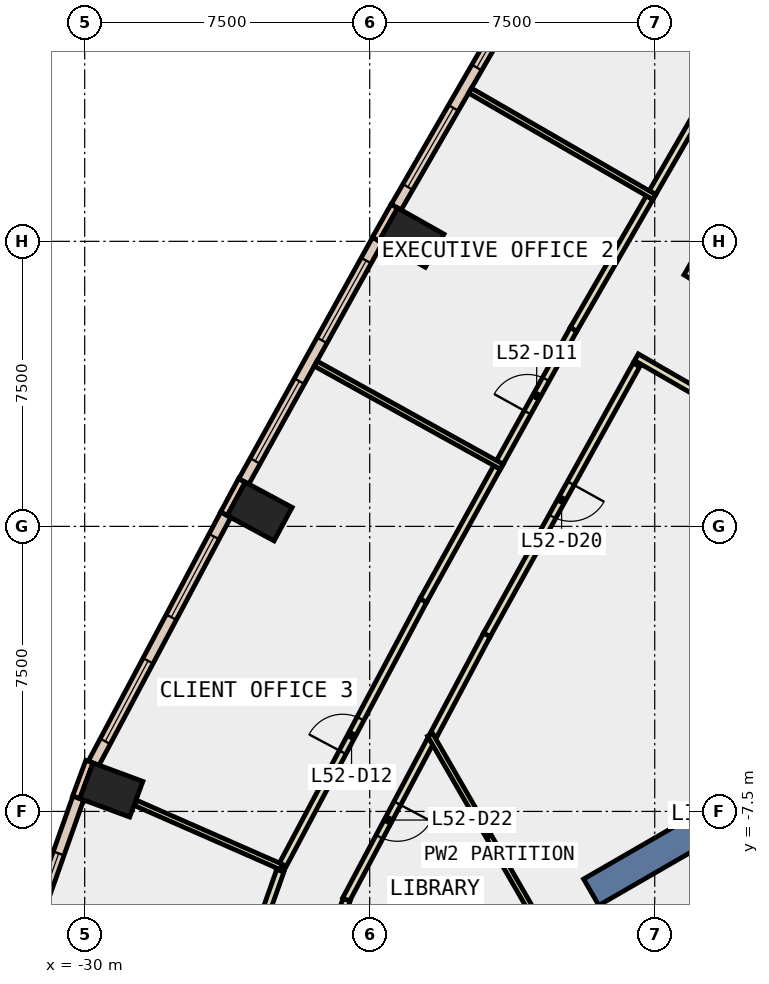
"""IFC4 building model, lengths in metres.
Left out: names, types, materials, properties, quantities, classifications, styles, units other than length and angle.
Written with IfcOpenShell. Run it as: python <this file> out.ifc"""

import sys

from ifc_helpers import new_model, si_unit, direction, frame, frame_2d, origin, origin_2d, place, context, subcontext, project, spatial, rectangle, extrude, element, fill, save


model = new_model("IFC4")
c1 = context("Model", 3, precision=1e-05, world=origin(), true_north=direction((0.0, 1.0)))
c2 = subcontext(c1, "Body", "Model", "MODEL_VIEW")
j1 = project(units=[si_unit("LENGTHUNIT", "METRE"), si_unit("PLANEANGLEUNIT", "RADIAN")], contexts=[c1])
p1 = place(None, origin())
s1 = spatial("IfcSite", under=j1, at=p1, CompositionType="ELEMENT")
p2 = place(p1, origin())
s2 = spatial("IfcBuilding", under=s1, at=p2, CompositionType="ELEMENT")
p3 = place(p2, frame((0.0, 0.0, 231.8)))
s3 = spatial("IfcBuildingStorey", under=s2, at=p3, CompositionType="ELEMENT", Elevation=231.8)
for number, where, z_axis, x_axis in (
    (1, (-21.4, 7.599, -0.4), (0.0, 0.0, 1.0), (0.491, 0.871, 0.0)),
    (2, (-25.395, 0.391, -0.4), (0.0, 0.0, 1.0), (0.474, 0.88, 0.0)),
    (3, (-29.299, -6.936, -0.4), (0.0, 0.0, 1.0), (0.347, 0.938, 0.0)),
):
    element("IfcColumn", number, at=place(p3, frame(where, z_axis=z_axis, x_axis=x_axis)), inside=s3, PredefinedType="COLUMN", context=c2, shape_type="SweptSolid", body=[
        extrude(rectangle(XDim=1.0, YDim=1.4, at=origin_2d()), origin(), (0.0, 0.0, 1.0), 4.0),
    ])
p4 = place(p3, frame((-8.877, -5.125, -0.4), z_axis=(0.0, 0.0, 1.0), x_axis=(-0.866017533419, -0.500013631625, 0.0)))
e4 = element("IfcWall", 4, at=p4, inside=s3, PredefinedType="SHEAR", context=c2, shape_type="SweptSolid", body=[
    extrude(rectangle(XDim=9.0, YDim=0.8, at=frame_2d((4.5, 0.0))), origin(), (0.0, 0.0, 1.0), 4.0),
])
p5 = place(p3, frame((-21.851, 8.427, 0.0), z_axis=(0.0, 0.0, 1.0), x_axis=(-0.491743606947, -0.87074004446, 0.0)))
e5 = element("IfcWall", 5, at=p5, inside=s3, PredefinedType="STANDARD", context=c2, shape_type="SweptSolid", body=[
    extrude(rectangle(XDim=1.0, YDim=0.2, at=frame_2d((0.5, 0.0))), origin(), (0.0, 0.0, 1.0), 3.6),
])
p6 = place(p3, frame((-25.862, 1.211, 0.0), z_axis=(0.0, 0.0, 1.0), x_axis=(-0.473765014438, -0.880651299377, 0.0)))
e6 = element("IfcWall", 6, at=p6, inside=s3, PredefinedType="STANDARD", context=c2, shape_type="SweptSolid", body=[
    extrude(rectangle(XDim=1.0, YDim=0.2, at=frame_2d((0.5, 0.0))), origin(), (0.0, 0.0, 1.0), 3.6),
])
p7 = place(p3, frame((-29.876, -6.19, 0.0), z_axis=(0.0, 0.0, 1.0), x_axis=(-0.346892928577, -0.937904737222, 0.0)))
e7 = element("IfcWall", 7, at=p7, inside=s3, PredefinedType="STANDARD", context=c2, shape_type="SweptSolid", body=[
    extrude(rectangle(XDim=1.0, YDim=0.2, at=frame_2d((0.5, 0.0))), origin(), (0.0, 0.0, 1.0), 3.6),
])
p8 = place(p3, frame((-18.175, 14.683, 0.0), z_axis=(0.0, 0.0, 1.0), x_axis=(-0.500075798504, -0.865981637075, 0.0)))
e8 = element("IfcWall", 8, at=p8, inside=s3, PredefinedType="STANDARD", context=c2, shape_type="SweptSolid", body=[
    extrude(rectangle(XDim=7.257, YDim=0.3, at=frame_2d((3.628, 0.0))), origin(), (0.0, 0.0, 1.0), 3.6),
])
p9 = place(p8, frame((0.614, 0.0, 0.9)))
e9 = element("IfcOpeningElement", 9, at=p9, cuts=e8, PredefinedType="OPENING", context=c2, shape_type="SweptSolid", body=[
    extrude(rectangle(XDim=2.4, YDim=2.6, at=frame_2d((1.2, 1.3))), frame((0.0, 0.16, 0.0), z_axis=(0.0, -1.0, 0.0), x_axis=(1.0, 0.0, 0.0)), (0.0, 0.0, 1.0), 0.32),
])
p10 = place(p8, frame((4.242, 0.0, 0.9)))
e10 = element("IfcOpeningElement", 10, at=p10, cuts=e8, PredefinedType="OPENING", context=c2, shape_type="SweptSolid", body=[
    extrude(rectangle(XDim=2.4, YDim=2.6, at=frame_2d((1.2, 1.3))), frame((0.0, 0.16, 0.0), z_axis=(0.0, -1.0, 0.0), x_axis=(1.0, 0.0, 0.0)), (0.0, 0.0, 1.0), 0.32),
])
p11 = place(p3, frame((-22.295, 7.531, 0.0), z_axis=(0.0, 0.0, 1.0), x_axis=(-0.484742980126, -0.874656643043, 0.0)))
e11 = element("IfcWall", 11, at=p11, inside=s3, PredefinedType="STANDARD", context=c2, shape_type="SweptSolid", body=[
    extrude(rectangle(XDim=7.258, YDim=0.3, at=frame_2d((3.629, 0.0))), origin(), (0.0, 0.0, 1.0), 3.6),
])
p12 = place(p11, frame((0.614, 0.0, 0.9)))
e12 = element("IfcOpeningElement", 12, at=p12, cuts=e11, PredefinedType="OPENING", context=c2, shape_type="SweptSolid", body=[
    extrude(rectangle(XDim=2.4, YDim=2.6, at=frame_2d((1.2, 1.3))), frame((0.0, 0.16, 0.0), z_axis=(0.0, -1.0, 0.0), x_axis=(1.0, 0.0, 0.0)), (0.0, 0.0, 1.0), 0.32),
])
p13 = place(p11, frame((4.243, 0.0, 0.9)))
e13 = element("IfcOpeningElement", 13, at=p13, cuts=e11, PredefinedType="OPENING", context=c2, shape_type="SweptSolid", body=[
    extrude(rectangle(XDim=2.4, YDim=2.6, at=frame_2d((1.2, 1.3))), frame((0.0, 0.16, 0.0), z_axis=(0.0, -1.0, 0.0), x_axis=(1.0, 0.0, 0.0)), (0.0, 0.0, 1.0), 0.32),
])
p14 = place(p3, frame((-26.289, 0.306, 0.0), z_axis=(0.0, 0.0, 1.0), x_axis=(-0.469429229062, -0.882970100797, 0.0)))
e14 = element("IfcWall", 14, at=p14, inside=s3, PredefinedType="STANDARD", context=c2, shape_type="SweptSolid", body=[
    extrude(rectangle(XDim=7.404, YDim=0.3, at=frame_2d((3.702, 0.0))), origin(), (0.0, 0.0, 1.0), 3.6),
])
p15 = place(p14, frame((0.651, 0.0, 0.9)))
e15 = element("IfcOpeningElement", 15, at=p15, cuts=e14, PredefinedType="OPENING", context=c2, shape_type="SweptSolid", body=[
    extrude(rectangle(XDim=2.4, YDim=2.6, at=frame_2d((1.2, 1.3))), frame((0.0, 0.16, 0.0), z_axis=(0.0, -1.0, 0.0), x_axis=(1.0, 0.0, 0.0)), (0.0, 0.0, 1.0), 0.32),
])
p16 = place(p14, frame((4.353, 0.0, 0.9)))
e16 = element("IfcOpeningElement", 16, at=p16, cuts=e14, PredefinedType="OPENING", context=c2, shape_type="SweptSolid", body=[
    extrude(rectangle(XDim=2.4, YDim=2.6, at=frame_2d((1.2, 1.3))), frame((0.0, 0.16, 0.0), z_axis=(0.0, -1.0, 0.0), x_axis=(1.0, 0.0, 0.0)), (0.0, 0.0, 1.0), 0.32),
])
p17 = place(p3, frame((-30.169, -7.147, 0.0), z_axis=(0.0, 0.0, 1.0), x_axis=(-0.333280640478, -0.942827669663, 0.0)))
e17 = element("IfcWall", 17, at=p17, inside=s3, PredefinedType="STANDARD", context=c2, shape_type="SweptSolid", body=[
    extrude(rectangle(XDim=4.492, YDim=0.3, at=frame_2d((2.246, 0.0))), origin(), (0.0, 0.0, 1.0), 3.6),
])
p18 = place(p17, frame((1.546, 0.0, 0.9)))
e18 = element("IfcOpeningElement", 18, at=p18, cuts=e17, PredefinedType="OPENING", context=c2, shape_type="SweptSolid", body=[
    extrude(rectangle(XDim=1.4, YDim=2.6, at=frame_2d((0.7, 1.3))), frame((0.0, 0.16, 0.0), z_axis=(0.0, -1.0, 0.0), x_axis=(1.0, 0.0, 0.0)), (0.0, 0.0, 1.0), 0.32),
])
p19 = place(p3, frame((-11.42, 11.283, 0.0), z_axis=(0.0, 0.0, 1.0), x_axis=(-0.500179011873, -0.86592202656, 0.0)))
e19 = element("IfcWall", 19, at=p19, inside=s3, PredefinedType="PARTITIONING", context=c2, shape_type="SweptSolid", body=[
    extrude(rectangle(XDim=5.446, YDim=0.2, at=frame_2d((2.723, 0.0))), origin(), (0.0, 0.0, 1.0), 3.6),
])
p20 = place(p19, frame((2.223, 0.0, 0.0)))
e20 = element("IfcOpeningElement", 20, at=p20, cuts=e19, PredefinedType="OPENING", context=c2, shape_type="SweptSolid", body=[
    extrude(rectangle(XDim=1.0, YDim=2.1, at=frame_2d((0.5, 1.05))), frame((0.0, 0.11, 0.0), z_axis=(0.0, -1.0, 0.0), x_axis=(1.0, 0.0, 0.0)), (0.0, 0.0, 1.0), 0.22),
])
p21 = place(p3, frame((-15.482, 4.249, 0.0), z_axis=(0.0, 0.0, 1.0), x_axis=(-0.484683114876, -0.874689818252, 0.0)))
e21 = element("IfcWall", 21, at=p21, inside=s3, PredefinedType="PARTITIONING", context=c2, shape_type="SweptSolid", body=[
    extrude(rectangle(XDim=8.123, YDim=0.2, at=frame_2d((4.062, 0.0))), origin(), (0.0, 0.0, 1.0), 3.6),
])
p22 = place(p21, frame((3.561, 0.0, 0.0)))
e22 = element("IfcOpeningElement", 22, at=p22, cuts=e21, PredefinedType="OPENING", context=c2, shape_type="SweptSolid", body=[
    extrude(rectangle(XDim=1.0, YDim=2.1, at=frame_2d((0.5, 1.05))), frame((0.0, 0.11, 0.0), z_axis=(0.0, -1.0, 0.0), x_axis=(1.0, 0.0, 0.0)), (0.0, 0.0, 1.0), 0.22),
])
p23 = place(p3, frame((-19.419, -2.856, 0.0), z_axis=(0.0, 0.0, 1.0), x_axis=(-0.469627838973, -0.882864481595, 0.0)))
e23 = element("IfcWall", 23, at=p23, inside=s3, PredefinedType="PARTITIONING", context=c2, shape_type="SweptSolid", body=[
    extrude(rectangle(XDim=2.996, YDim=0.2, at=frame_2d((1.498, 0.0))), origin(), (0.0, 0.0, 1.0), 3.6),
])
p24 = place(p3, frame((-20.896, -5.634, 0.0), z_axis=(0.0, 0.0, 1.0), x_axis=(-0.469448951755, -0.882959614986, 0.0)))
e24 = element("IfcWall", 24, at=p24, inside=s3, PredefinedType="PARTITIONING", context=c2, shape_type="SweptSolid", body=[
    extrude(rectangle(XDim=4.74, YDim=0.2, at=frame_2d((2.37, 0.0))), origin(), (0.0, 0.0, 1.0), 3.6),
])
p25 = place(p24, frame((1.87, 0.0, 0.0)))
e25 = element("IfcOpeningElement", 25, at=p25, cuts=e24, PredefinedType="OPENING", context=c2, shape_type="SweptSolid", body=[
    extrude(rectangle(XDim=1.0, YDim=2.1, at=frame_2d((0.5, 1.05))), frame((0.0, 0.11, 0.0), z_axis=(0.0, -1.0, 0.0), x_axis=(1.0, 0.0, 0.0)), (0.0, 0.0, 1.0), 0.22),
])
p26 = place(p3, frame((-23.108, -9.825, 0.0), z_axis=(0.0, 0.0, 1.0), x_axis=(-0.333166995935, -0.942867834227, 0.0)))
e26 = element("IfcWall", 26, at=p26, inside=s3, PredefinedType="PARTITIONING", context=c2, shape_type="SweptSolid", body=[
    extrude(rectangle(XDim=2.798, YDim=0.2, at=frame_2d((1.399, 0.0))), origin(), (0.0, 0.0, 1.0), 3.6),
])
p27 = place(p3, frame((-15.059, 8.78, 0.0), z_axis=(0.0, 0.0, 1.0), x_axis=(0.500093699572, 0.865971299552, 0.0)))
e27 = element("IfcWall", 27, at=p27, inside=s3, PredefinedType="PARTITIONING", context=c2, shape_type="SweptSolid", body=[
    extrude(rectangle(XDim=4.004, YDim=0.2, at=frame_2d((2.002, 0.0))), origin(), (0.0, 0.0, 1.0), 3.6),
])
p28 = place(p3, frame((-19.076, 1.684, 0.0), z_axis=(0.0, 0.0, 1.0), x_axis=(0.484679349661, 0.874691904623, 0.0)))
e28 = element("IfcWall", 28, at=p28, inside=s3, PredefinedType="PARTITIONING", context=c2, shape_type="SweptSolid", body=[
    extrude(rectangle(XDim=4.002, YDim=0.2, at=frame_2d((2.001, 0.0))), origin(), (0.0, 0.0, 1.0), 3.6),
])
p29 = place(p28, frame((1.501, 0.0, 0.0)))
e29 = element("IfcOpeningElement", 29, at=p29, cuts=e28, PredefinedType="OPENING", context=c2, shape_type="SweptSolid", body=[
    extrude(rectangle(XDim=1.0, YDim=2.1, at=frame_2d((0.5, 1.05))), frame((0.0, 0.11, 0.0), z_axis=(0.0, -1.0, 0.0), x_axis=(1.0, 0.0, 0.0)), (0.0, 0.0, 1.0), 0.22),
])
p30 = place(p3, frame((-17.136, 5.185, 0.0), z_axis=(0.0, 0.0, 1.0), x_axis=(0.500102734445, 0.865966081899, 0.0)))
e30 = element("IfcWall", 30, at=p30, inside=s3, PredefinedType="PARTITIONING", context=c2, shape_type="SweptSolid", body=[
    extrude(rectangle(XDim=4.001, YDim=0.2, at=frame_2d((2.0, 0.0))), origin(), (0.0, 0.0, 1.0), 3.6),
])
p31 = place(p3, frame((-24.866, -9.053, 0.0), z_axis=(0.0, 0.0, 1.0), x_axis=(0.469431794586, 0.882968736837, 0.0)))
e31 = element("IfcWall", 31, at=p31, inside=s3, PredefinedType="PARTITIONING", context=c2, shape_type="SweptSolid", body=[
    extrude(rectangle(XDim=8.046, YDim=0.2, at=frame_2d((4.023, 0.0))), origin(), (0.0, 0.0, 1.0), 3.6),
])
p32 = place(p31, frame((3.522, 0.0, 0.0)))
e32 = element("IfcOpeningElement", 32, at=p32, cuts=e31, PredefinedType="OPENING", context=c2, shape_type="SweptSolid", body=[
    extrude(rectangle(XDim=1.0, YDim=2.1, at=frame_2d((0.5, 1.05))), frame((0.0, 0.11, 0.0), z_axis=(0.0, -1.0, 0.0), x_axis=(1.0, 0.0, 0.0)), (0.0, 0.0, 1.0), 0.22),
])
p33 = place(p3, frame((-21.089, -1.949, 0.0), z_axis=(0.0, 0.0, 1.0), x_axis=(0.484622593188, 0.874723351793, 0.0)))
e33 = element("IfcWall", 33, at=p33, inside=s3, PredefinedType="PARTITIONING", context=c2, shape_type="SweptSolid", body=[
    extrude(rectangle(XDim=4.003, YDim=0.2, at=frame_2d((2.002, 0.0))), origin(), (0.0, 0.0, 1.0), 3.6),
])
p34 = place(p3, frame((-26.013, -12.345, 0.0), z_axis=(0.0, 0.0, 1.0), x_axis=(0.333116923704, 0.942885526001, 0.0)))
e34 = element("IfcWall", 34, at=p34, inside=s3, PredefinedType="PARTITIONING", context=c2, shape_type="SweptSolid", body=[
    extrude(rectangle(XDim=3.485, YDim=0.2, at=frame_2d((1.742, 0.0))), origin(), (0.0, 0.0, 1.0), 3.6),
])
p35 = place(p3, frame((-17.87, -10.749, 0.0), z_axis=(0.0, 0.0, 1.0), x_axis=(-0.499907758807, 0.866078652713, 0.0)))
e35 = element("IfcWall", 35, at=p35, inside=s3, PredefinedType="PARTITIONING", context=c2, shape_type="SweptSolid", body=[
    extrude(rectangle(XDim=6.083, YDim=0.15, at=frame_2d((3.042, 0.0))), origin(), (0.0, 0.0, 1.0), 3.6),
])
p36 = place(p3, frame((-15.01, 8.665, 0.0), z_axis=(0.0, 0.0, 1.0), x_axis=(-0.865961984968, 0.500109828528, 0.0)))
e36 = element("IfcWall", 36, at=p36, inside=s3, PredefinedType="PARTITIONING", context=c2, shape_type="SweptSolid", body=[
    extrude(rectangle(XDim=5.601, YDim=0.15, at=frame_2d((2.8, 0.0))), origin(), (0.0, 0.0, 1.0), 3.6),
])
p37 = place(p3, frame((-19.025, 1.57, 0.0), z_axis=(0.0, 0.0, 1.0), x_axis=(-0.874714019242, 0.484639437666, 0.0)))
e37 = element("IfcWall", 37, at=p37, inside=s3, PredefinedType="PARTITIONING", context=c2, shape_type="SweptSolid", body=[
    extrude(rectangle(XDim=5.6, YDim=0.15, at=frame_2d((2.8, 0.0))), origin(), (0.0, 0.0, 1.0), 3.6),
])
p38 = place(p3, frame((-24.819, -8.964, 0.0), z_axis=(0.0, 0.0, 1.0), x_axis=(-0.915460951187, 0.402406817602, 0.0)))
e38 = element("IfcWall", 38, at=p38, inside=s3, PredefinedType="PARTITIONING", context=c2, shape_type="SweptSolid", body=[
    extrude(rectangle(XDim=4.192, YDim=0.15, at=frame_2d((2.096, 0.0))), origin(), (0.0, 0.0, 1.0), 3.6),
])
p39 = place(p3, frame((-13.59, 3.36, 0.0), z_axis=(0.0, 0.0, 1.0), x_axis=(-0.866004963011, 0.500035402787, 0.0)))
e39 = element("IfcWall", 39, at=p39, inside=s3, PredefinedType="PARTITIONING", context=c2, shape_type="SweptSolid", body=[
    extrude(rectangle(XDim=2.183, YDim=0.2, at=frame_2d((1.092, 0.0))), origin(), (0.0, 0.0, 1.0), 3.6),
])
p40 = place(p9, origin())
e40 = element("IfcWindow", 40, at=p40, inside=s3, PartitioningType="SINGLE_PANEL", PredefinedType="WINDOW", context=c2, shape_type="SweptSolid", body=[
    extrude(rectangle(XDim=2.4, YDim=2.6, at=frame_2d((1.2, 1.3))), frame((0.0, 0.03, 0.0), z_axis=(0.0, -1.0, 0.0), x_axis=(1.0, 0.0, 0.0)), (0.0, 0.0, 1.0), 0.06),
])
fill(e9, e40)
p41 = place(p10, origin())
e41 = element("IfcWindow", 41, at=p41, inside=s3, PartitioningType="SINGLE_PANEL", PredefinedType="WINDOW", context=c2, shape_type="SweptSolid", body=[
    extrude(rectangle(XDim=2.4, YDim=2.6, at=frame_2d((1.2, 1.3))), frame((0.0, 0.03, 0.0), z_axis=(0.0, -1.0, 0.0), x_axis=(1.0, 0.0, 0.0)), (0.0, 0.0, 1.0), 0.06),
])
fill(e10, e41)
p42 = place(p12, origin())
e42 = element("IfcWindow", 42, at=p42, inside=s3, PartitioningType="SINGLE_PANEL", PredefinedType="WINDOW", context=c2, shape_type="SweptSolid", body=[
    extrude(rectangle(XDim=2.4, YDim=2.6, at=frame_2d((1.2, 1.3))), frame((0.0, 0.03, 0.0), z_axis=(0.0, -1.0, 0.0), x_axis=(1.0, 0.0, 0.0)), (0.0, 0.0, 1.0), 0.06),
])
fill(e12, e42)
p43 = place(p13, origin())
e43 = element("IfcWindow", 43, at=p43, inside=s3, PartitioningType="SINGLE_PANEL", PredefinedType="WINDOW", context=c2, shape_type="SweptSolid", body=[
    extrude(rectangle(XDim=2.4, YDim=2.6, at=frame_2d((1.2, 1.3))), frame((0.0, 0.03, 0.0), z_axis=(0.0, -1.0, 0.0), x_axis=(1.0, 0.0, 0.0)), (0.0, 0.0, 1.0), 0.06),
])
fill(e13, e43)
p44 = place(p15, origin())
e44 = element("IfcWindow", 44, at=p44, inside=s3, PartitioningType="SINGLE_PANEL", PredefinedType="WINDOW", context=c2, shape_type="SweptSolid", body=[
    extrude(rectangle(XDim=2.4, YDim=2.6, at=frame_2d((1.2, 1.3))), frame((0.0, 0.03, 0.0), z_axis=(0.0, -1.0, 0.0), x_axis=(1.0, 0.0, 0.0)), (0.0, 0.0, 1.0), 0.06),
])
fill(e15, e44)
p45 = place(p16, origin())
e45 = element("IfcWindow", 45, at=p45, inside=s3, PartitioningType="SINGLE_PANEL", PredefinedType="WINDOW", context=c2, shape_type="SweptSolid", body=[
    extrude(rectangle(XDim=2.4, YDim=2.6, at=frame_2d((1.2, 1.3))), frame((0.0, 0.03, 0.0), z_axis=(0.0, -1.0, 0.0), x_axis=(1.0, 0.0, 0.0)), (0.0, 0.0, 1.0), 0.06),
])
fill(e16, e45)
p46 = place(p18, origin())
e46 = element("IfcWindow", 46, at=p46, inside=s3, PartitioningType="SINGLE_PANEL", PredefinedType="WINDOW", context=c2, shape_type="SweptSolid", body=[
    extrude(rectangle(XDim=1.4, YDim=2.6, at=frame_2d((0.7, 1.3))), frame((0.0, 0.03, 0.0), z_axis=(0.0, -1.0, 0.0), x_axis=(1.0, 0.0, 0.0)), (0.0, 0.0, 1.0), 0.06),
])
fill(e18, e46)
p47 = place(p29, origin())
e47 = element("IfcDoor", 47, at=p47, inside=s3, OperationType="SINGLE_SWING_LEFT", PredefinedType="DOOR", context=c2, shape_type="SweptSolid", body=[
    extrude(rectangle(XDim=1.0, YDim=2.1, at=frame_2d((0.5, 1.05))), frame((0.0, 0.025, 0.0), z_axis=(0.0, -1.0, 0.0), x_axis=(1.0, 0.0, 0.0)), (0.0, 0.0, 1.0), 0.05),
])
fill(e29, e47)
p48 = place(p32, origin())
e48 = element("IfcDoor", 48, at=p48, inside=s3, OperationType="SINGLE_SWING_LEFT", PredefinedType="DOOR", context=c2, shape_type="SweptSolid", body=[
    extrude(rectangle(XDim=1.0, YDim=2.1, at=frame_2d((0.5, 1.05))), frame((0.0, 0.025, 0.0), z_axis=(0.0, -1.0, 0.0), x_axis=(1.0, 0.0, 0.0)), (0.0, 0.0, 1.0), 0.05),
])
fill(e32, e48)
p49 = place(p22, origin())
e49 = element("IfcDoor", 49, at=p49, inside=s3, OperationType="SINGLE_SWING_LEFT", PredefinedType="DOOR", context=c2, shape_type="SweptSolid", body=[
    extrude(rectangle(XDim=1.0, YDim=2.1, at=frame_2d((0.5, 1.05))), frame((0.0, 0.025, 0.0), z_axis=(0.0, -1.0, 0.0), x_axis=(1.0, 0.0, 0.0)), (0.0, 0.0, 1.0), 0.05),
])
fill(e22, e49)
p50 = place(p25, origin())
e50 = element("IfcDoor", 50, at=p50, inside=s3, OperationType="SINGLE_SWING_LEFT", PredefinedType="DOOR", context=c2, shape_type="SweptSolid", body=[
    extrude(rectangle(XDim=1.0, YDim=2.1, at=frame_2d((0.5, 1.05))), frame((0.0, 0.025, 0.0), z_axis=(0.0, -1.0, 0.0), x_axis=(1.0, 0.0, 0.0)), (0.0, 0.0, 1.0), 0.05),
])
fill(e25, e50)
save(model, sys.argv[1])
